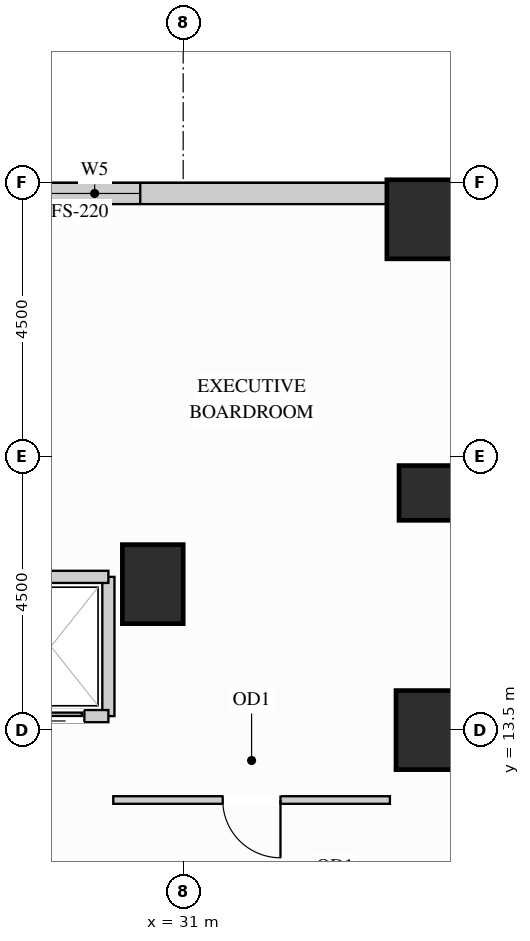
"""IFC4 building model, lengths in metres.
Left out: names, types, materials, properties, quantities, classifications, styles, units other than length and angle.
Written with IfcOpenShell. Run it as: python <this file> out.ifc"""

import sys

from ifc_helpers import new_model, si_unit, direction, frame, frame_2d, origin, origin_2d, place, context, subcontext, project, spatial, rectangle, extrude, source, transform, mapped, element, fill, save


model = new_model("IFC4")
c1 = context("Model", 3, precision=1e-05, world=origin(), true_north=direction((0.0, 1.0)))
c2 = subcontext(c1, "Body", "Model", "MODEL_VIEW")
j1 = project(units=[si_unit("LENGTHUNIT", "METRE"), si_unit("PLANEANGLEUNIT", "RADIAN")], contexts=[c1])
p1 = place(None, origin())
s1 = spatial("IfcSite", under=j1, at=p1, CompositionType="ELEMENT")
p2 = place(p1, origin())
s2 = spatial("IfcBuilding", under=s1, at=p2, CompositionType="ELEMENT")
p3 = place(p2, frame((0.0, 0.0, 51.3)))
s3 = spatial("IfcBuildingStorey", under=s2, at=p3, CompositionType="ELEMENT", Elevation=51.3)
m1 = source(origin(), c2, "Body", "SweptSolid", [
    extrude(rectangle(XDim=0.9, YDim=0.9, at=origin_2d()), origin(), (0.0, 0.0, 1.0), 3.38),
])
p4 = place(p3, frame((35.0, 17.4, 0.0), z_axis=(0.0, 0.0, 1.0), x_axis=(1.0, 0.0, 0.0)))
e1 = element("IfcColumn", 1, at=p4, inside=s3, PredefinedType="COLUMN", context=c2, shape_type="MappedRepresentation", body=[
    mapped(m1, transform((0.0, 0.0, 0.0), x_axis=(1.0, 0.0, 0.0), y_axis=(0.0, 1.0, 0.0), z_axis=(0.0, 0.0, 1.0))),
])
m2 = source(origin(), c2, "Body", "SweptSolid", [
    extrude(rectangle(XDim=1.0, YDim=1.3, at=origin_2d()), origin(), (0.0, 0.0, 1.0), 3.38),
])
for number, where, z_axis, x_axis in (
    (2, (35.0, 13.5, 0.0), (0.0, 0.0, 1.0), (1.0, 0.0, 0.0)),
    (3, (30.5, 15.9, 0.0), (0.0, 0.0, 1.0), (1.0, 0.0, 0.0)),
):
    element("IfcColumn", number, at=place(p3, frame(where, z_axis=z_axis, x_axis=x_axis)), inside=s3, PredefinedType="COLUMN", context=c2, shape_type="MappedRepresentation", body=[
        mapped(m2, transform((0.0, 0.0, 0.0), x_axis=(1.0, 0.0, 0.0), y_axis=(0.0, 1.0, 0.0), z_axis=(0.0, 0.0, 1.0))),
    ])
m3 = source(origin(), c2, "Body", "SweptSolid", [
    extrude(rectangle(XDim=1.3, YDim=1.3, at=origin_2d()), origin(), (0.0, 0.0, 1.0), 3.38),
])
p5 = place(p3, frame((35.0, 21.9, 0.0), z_axis=(0.0, 0.0, 1.0), x_axis=(1.0, 0.0, 0.0)))
e4 = element("IfcColumn", 4, at=p5, inside=s3, PredefinedType="COLUMN", context=c2, shape_type="MappedRepresentation", body=[
    mapped(m3, transform((0.0, 0.0, 0.0), x_axis=(1.0, 0.0, 0.0), y_axis=(0.0, 1.0, 0.0), z_axis=(0.0, 0.0, 1.0))),
])
p6 = place(p3, frame((34.352, 22.325, 0.0), z_axis=(0.0, 0.0, 1.0), x_axis=(-1.0, 0.0, 0.0)))
e5 = element("IfcWall", 5, at=p6, inside=s3, PredefinedType="SOLIDWALL", context=c2, shape_type="SweptSolid", body=[
    extrude(rectangle(XDim=14.854, YDim=0.35, at=frame_2d((7.427, 0.0))), origin(), (0.0, 0.0, 1.0), 3.365),
])
p7 = place(p6, frame((4.058, 0.0, 0.78)))
e6 = element("IfcOpeningElement", 6, at=p7, cuts=e5, PredefinedType="OPENING", context=c2, shape_type="SweptSolid", body=[
    extrude(rectangle(XDim=1.5, YDim=2.0, at=frame_2d((0.75, 1.0))), frame((0.0, 0.185, 0.0), z_axis=(0.0, -1.0, 0.0), x_axis=(1.0, 0.0, 0.0)), (0.0, 0.0, 1.0), 0.37),
])
p8 = place(p6, frame((9.296, 0.0, 0.78)))
e7 = element("IfcOpeningElement", 7, at=p8, cuts=e5, PredefinedType="OPENING", context=c2, shape_type="SweptSolid", body=[
    extrude(rectangle(XDim=1.5, YDim=2.0, at=frame_2d((0.75, 1.0))), frame((0.0, 0.185, 0.0), z_axis=(0.0, -1.0, 0.0), x_axis=(1.0, 0.0, 0.0)), (0.0, 0.0, 1.0), 0.37),
])
p9 = place(p3, frame((29.85, 12.35, 0.0), z_axis=(0.0, 0.0, 1.0), x_axis=(1.0, 0.0, 0.0)))
e8 = element("IfcWall", 8, at=p9, inside=s3, PredefinedType="PARTITIONING", context=c2, shape_type="SweptSolid", body=[
    extrude(rectangle(XDim=4.55, YDim=0.125, at=frame_2d((2.275, 0.0))), origin(), (0.0, 0.0, 1.0), 3.365),
])
p10 = place(p9, frame((1.8, 0.0, 0.0)))
e9 = element("IfcOpeningElement", 9, at=p10, cuts=e8, PredefinedType="OPENING", context=c2, shape_type="SweptSolid", body=[
    extrude(rectangle(XDim=0.95, YDim=2.15, at=frame_2d((0.475, 1.075))), frame((0.0, 0.073, 0.0), z_axis=(0.0, -1.0, 0.0), x_axis=(1.0, 0.0, 0.0)), (0.0, 0.0, 1.0), 0.145),
])
m4 = source(origin(), c2, "Body", "SweptSolid", [
    extrude(rectangle(XDim=2.29, YDim=0.2, at=frame_2d((1.145, 0.0))), origin(), (0.0, 0.0, 1.0), 3.365),
])
p11 = place(p3, frame((29.77, 13.73, 0.0), z_axis=(0.0, 0.0, 1.0), x_axis=(0.0, 1.0, 0.0)))
e10 = element("IfcWall", 10, at=p11, inside=s3, PredefinedType="PARTITIONING", context=c2, shape_type="MappedRepresentation", body=[
    mapped(m4, transform((0.0, 0.0, 0.0), x_axis=(1.0, 0.0, 0.0), y_axis=(0.0, 1.0, 0.0), z_axis=(0.0, 0.0, 1.0))),
])
m5 = source(origin(), c2, "Body", "SweptSolid", [
    extrude(rectangle(XDim=1.89, YDim=0.2, at=frame_2d((0.945, 0.0))), origin(), (0.0, 0.0, 1.0), 2.67),
])
p12 = place(p3, frame((27.88, 16.02, 0.0), z_axis=(0.0, 0.0, 1.0), x_axis=(1.0, 0.0, 0.0)))
e11 = element("IfcWall", 11, at=p12, inside=s3, PredefinedType="PARTITIONING", context=c2, shape_type="MappedRepresentation", body=[
    mapped(m5, transform((0.0, 0.0, 0.0), x_axis=(1.0, 0.0, 0.0), y_axis=(0.0, 1.0, 0.0), z_axis=(0.0, 0.0, 1.0))),
])
p13 = place(p3, frame((27.88, 13.73, 0.0), z_axis=(0.0, 0.0, 1.0), x_axis=(1.0, 0.0, 0.0)))
e12 = element("IfcWall", 12, at=p13, inside=s3, PredefinedType="PARTITIONING", context=c2, shape_type="SweptSolid", body=[
    extrude(rectangle(XDim=1.89, YDim=0.2, at=frame_2d((0.945, 0.0))), origin(), (0.0, 0.0, 1.0), 2.446),
])
p14 = place(p13, frame((0.395, 0.0, 0.0)))
e13 = element("IfcOpeningElement", 13, at=p14, cuts=e12, PredefinedType="OPENING", context=c2, shape_type="SweptSolid", body=[
    extrude(rectangle(XDim=1.1, YDim=2.2, at=frame_2d((0.55, 1.1))), frame((0.0, 0.11, 0.0), z_axis=(0.0, -1.0, 0.0), x_axis=(1.0, 0.0, 0.0)), (0.0, 0.0, 1.0), 0.22),
])
m6 = source(origin(), c2, "Body", "SweptSolid", [
    extrude(rectangle(XDim=1.1, YDim=2.2, at=frame_2d((0.55, 1.1))), frame((0.0, 0.025, 0.0), z_axis=(0.0, -1.0, 0.0), x_axis=(1.0, 0.0, 0.0)), (0.0, 0.0, 1.0), 0.05),
])
p15 = place(p14, origin())
e14 = element("IfcDoor", 14, at=p15, inside=s3, OperationType="SLIDING_TO_LEFT", PredefinedType="DOOR", context=c2, shape_type="MappedRepresentation", body=[
    mapped(m6, transform((0.0, 0.0, 0.0), x_axis=(1.0, 0.0, 0.0), y_axis=(0.0, 1.0, 0.0), z_axis=(0.0, 0.0, 1.0))),
])
fill(e13, e14)
m7 = source(origin(), c2, "Body", "SweptSolid", [
    extrude(rectangle(XDim=0.95, YDim=2.15, at=frame_2d((0.475, 1.075))), frame((0.0, 0.025, 0.0), z_axis=(0.0, -1.0, 0.0), x_axis=(1.0, 0.0, 0.0)), (0.0, 0.0, 1.0), 0.05),
])
p16 = place(p10, origin())
e15 = element("IfcDoor", 15, at=p16, inside=s3, OperationType="SINGLE_SWING_RIGHT", PredefinedType="DOOR", context=c2, shape_type="MappedRepresentation", body=[
    mapped(m7, transform((0.0, 0.0, 0.0), x_axis=(1.0, 0.0, 0.0), y_axis=(0.0, 1.0, 0.0), z_axis=(0.0, 0.0, 1.0))),
])
fill(e9, e15)
m8 = source(origin(), c2, "Body", "SweptSolid", [
    extrude(rectangle(XDim=1.5, YDim=2.0, at=frame_2d((0.75, 1.0))), frame((0.0, 0.03, 0.0), z_axis=(0.0, -1.0, 0.0), x_axis=(1.0, 0.0, 0.0)), (0.0, 0.0, 1.0), 0.06),
])
p17 = place(p7, origin())
e16 = element("IfcWindow", 16, at=p17, inside=s3, PartitioningType="SINGLE_PANEL", PredefinedType="WINDOW", context=c2, shape_type="MappedRepresentation", body=[
    mapped(m8, transform((0.0, 0.0, 0.0), x_axis=(1.0, 0.0, 0.0), y_axis=(0.0, 1.0, 0.0), z_axis=(0.0, 0.0, 1.0))),
])
fill(e6, e16)
save(model, sys.argv[1])
